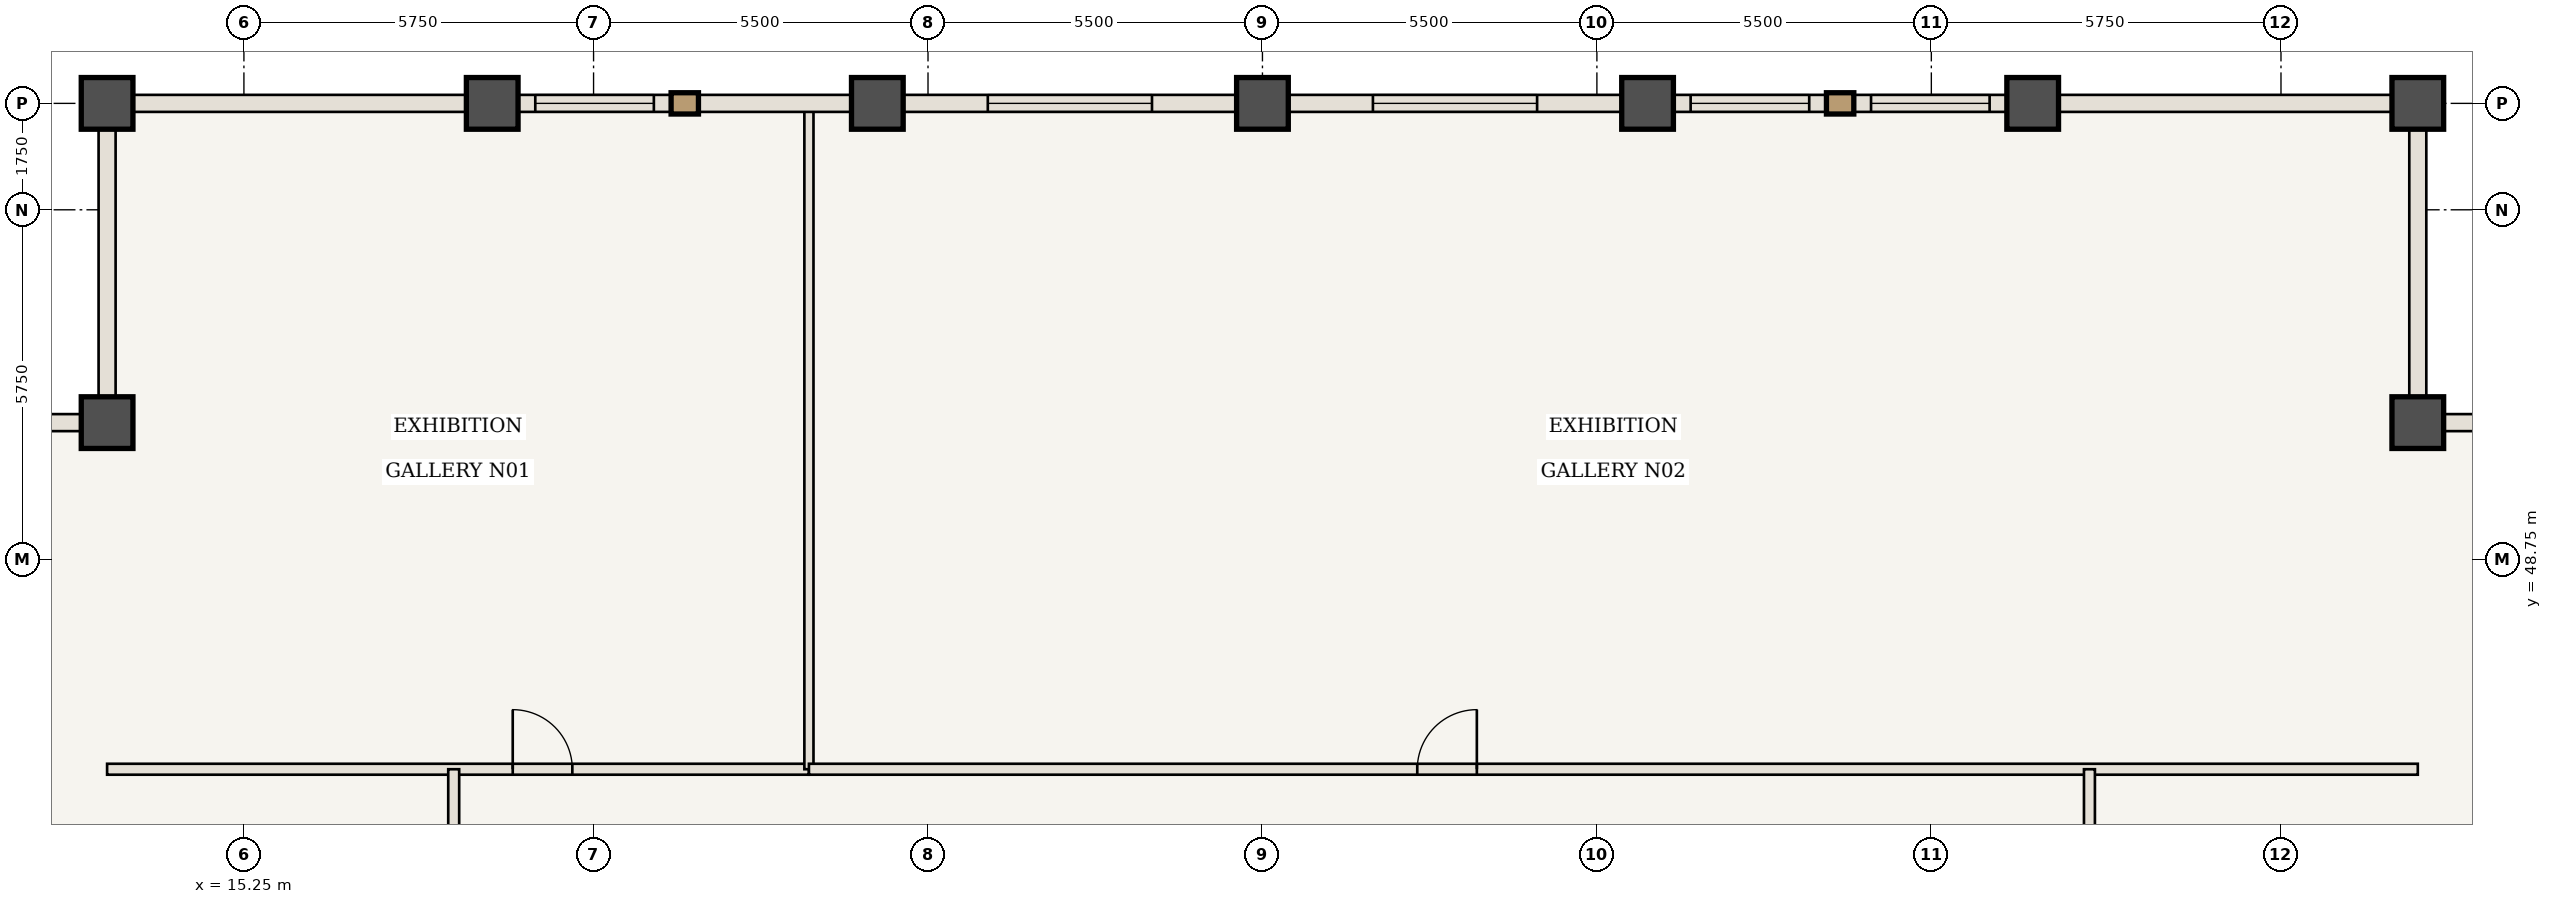
"""IFC4 building model, lengths in metres.
Left out: names, types, materials, properties, quantities, classifications, styles, units other than length and angle.
Written with IfcOpenShell. Run it as: python <this file> out.ifc"""

import sys

from ifc_helpers import new_model, si_unit, direction, frame, frame_2d, origin, origin_2d, place, context, subcontext, project, spatial, rectangle, extrude, element, fill, save


model = new_model("IFC4")
c1 = context("Model", 3, precision=1e-05, world=origin(), true_north=direction((0.0, 1.0)))
c2 = subcontext(c1, "Body", "Model", "MODEL_VIEW")
j1 = project(units=[si_unit("LENGTHUNIT", "METRE"), si_unit("PLANEANGLEUNIT", "RADIAN")], contexts=[c1])
p1 = place(None, origin())
s1 = spatial("IfcSite", under=j1, at=p1, CompositionType="ELEMENT")
p2 = place(p1, origin())
s2 = spatial("IfcBuilding", under=s1, at=p2, CompositionType="ELEMENT")
p3 = place(p2, frame((0.0, 0.0, 213.85)))
s3 = spatial("IfcBuildingStorey", under=s2, at=p3, CompositionType="ELEMENT", Elevation=213.85)
for number, where, z_axis, x_axis in (
    (1, (51.0, 51.0, 0.0), (0.0, 0.0, 1.0), (1.0, 0.0, 0.0)),
    (2, (51.0, 56.25, 0.0), (0.0, 0.0, 1.0), (1.0, 0.0, 0.0)),
    (3, (13.0, 56.25, 0.0), (0.0, 0.0, 1.0), (1.0, 0.0, 0.0)),
    (4, (13.0, 51.0, 0.0), (0.0, 0.0, 1.0), (1.0, 0.0, 0.0)),
    (5, (19.333, 56.25, 0.0), (0.0, 0.0, 1.0), (1.0, 0.0, 0.0)),
    (6, (25.667, 56.25, 0.0), (0.0, 0.0, 1.0), (1.0, 0.0, 0.0)),
    (7, (32.0, 56.25, 0.0), (0.0, 0.0, 1.0), (1.0, 0.0, 0.0)),
    (8, (38.333, 56.25, 0.0), (0.0, 0.0, 1.0), (1.0, 0.0, 0.0)),
    (9, (44.667, 56.25, 0.0), (0.0, 0.0, 1.0), (1.0, 0.0, 0.0)),
):
    element("IfcColumn", number, at=place(p3, frame(where, z_axis=z_axis, x_axis=x_axis)), inside=s3, PredefinedType="COLUMN", context=c2, shape_type="SweptSolid", body=[
        extrude(rectangle(XDim=0.85, YDim=0.85, at=origin_2d()), origin(), (0.0, 0.0, 1.0), 3.85),
    ])
p4 = place(p3, frame((13.0, 45.3, 0.0), z_axis=(0.0, 0.0, 1.0), x_axis=(1.0, 0.0, 0.0)))
e10 = element("IfcWall", 10, at=p4, inside=s3, PredefinedType="STANDARD", context=c2, shape_type="SweptSolid", body=[
    extrude(rectangle(XDim=11.542, YDim=0.18, at=frame_2d((5.771, 0.0))), origin(), (0.0, 0.0, 1.0), 3.685),
])
p5 = place(p4, frame((6.671, 0.0, 0.0)))
e11 = element("IfcOpeningElement", 11, at=p5, cuts=e10, PredefinedType="OPENING", context=c2, shape_type="SweptSolid", body=[
    extrude(rectangle(XDim=0.98, YDim=2.2, at=frame_2d((0.49, 1.1))), frame((0.0, 0.1, 0.0), z_axis=(0.0, -1.0, 0.0), x_axis=(1.0, 0.0, 0.0)), (0.0, 0.0, 1.0), 0.2),
])
p6 = place(p3, frame((24.542, 45.3, 0.0), z_axis=(0.0, 0.0, 1.0), x_axis=(0.0, 1.0, 0.0)))
e12 = element("IfcWall", 12, at=p6, inside=s3, PredefinedType="STANDARD", context=c2, shape_type="SweptSolid", body=[
    extrude(rectangle(XDim=10.89, YDim=0.15, at=frame_2d((5.445, 0.0))), origin(), (0.0, 0.0, 1.0), 3.685),
])
p7 = place(p3, frame((24.542, 45.3, 0.0), z_axis=(0.0, 0.0, 1.0), x_axis=(1.0, 0.0, 0.0)))
e13 = element("IfcWall", 13, at=p7, inside=s3, PredefinedType="STANDARD", context=c2, shape_type="SweptSolid", body=[
    extrude(rectangle(XDim=26.458, YDim=0.18, at=frame_2d((13.229, 0.0))), origin(), (0.0, 0.0, 1.0), 3.685),
])
p8 = place(p7, frame((10.004, 0.0, 0.0)))
e14 = element("IfcOpeningElement", 14, at=p8, cuts=e13, PredefinedType="OPENING", context=c2, shape_type="SweptSolid", body=[
    extrude(rectangle(XDim=0.98, YDim=2.2, at=frame_2d((0.49, 1.1))), frame((0.0, 0.1, 0.0), z_axis=(0.0, -1.0, 0.0), x_axis=(1.0, 0.0, 0.0)), (0.0, 0.0, 1.0), 0.2),
])
p9 = place(p3, frame((18.7, 39.258, 0.0), z_axis=(0.0, 0.0, 1.0), x_axis=(0.0, 1.0, 0.0)))
e15 = element("IfcWall", 15, at=p9, inside=s3, PredefinedType="STANDARD", context=c2, shape_type="SweptSolid", body=[
    extrude(rectangle(XDim=6.042, YDim=0.18, at=frame_2d((3.021, 0.0))), origin(), (0.0, 0.0, 1.0), 3.685),
])
p10 = place(p9, frame((1.071, 0.0, 0.0)))
e16 = element("IfcOpeningElement", 16, at=p10, cuts=e15, PredefinedType="OPENING", context=c2, shape_type="SweptSolid", body=[
    extrude(rectangle(XDim=0.98, YDim=2.2, at=frame_2d((0.49, 1.1))), frame((0.0, 0.1, 0.0), z_axis=(0.0, -1.0, 0.0), x_axis=(1.0, 0.0, 0.0)), (0.0, 0.0, 1.0), 0.2),
])
p11 = place(p3, frame((45.6, 32.85, 0.0), z_axis=(0.0, 0.0, 1.0), x_axis=(0.0, 1.0, 0.0)))
e17 = element("IfcWall", 17, at=p11, inside=s3, PredefinedType="STANDARD", context=c2, shape_type="SweptSolid", body=[
    extrude(rectangle(XDim=12.45, YDim=0.18, at=frame_2d((6.225, 0.0))), origin(), (0.0, 0.0, 1.0), 3.685),
])
p12 = place(p11, frame((5.725, 0.0, 0.0)))
e18 = element("IfcOpeningElement", 18, at=p12, cuts=e17, PredefinedType="OPENING", context=c2, shape_type="SweptSolid", body=[
    extrude(rectangle(XDim=0.98, YDim=2.2, at=frame_2d((0.49, 1.1))), frame((0.0, 0.1, 0.0), z_axis=(0.0, -1.0, 0.0), x_axis=(1.0, 0.0, 0.0)), (0.0, 0.0, 1.0), 0.2),
])
p13 = place(p3, frame((13.0, 56.25, 0.0), z_axis=(0.0, 0.0, 1.0), x_axis=(1.0, 0.0, 0.0)))
e19 = element("IfcWall", 19, at=p13, inside=s3, PredefinedType="USERDEFINED", context=c2, shape_type="SweptSolid", body=[
    extrude(rectangle(XDim=6.333, YDim=0.28, at=frame_2d((3.167, 0.0))), origin(), (0.0, 0.0, 1.0), 2.985),
])
p14 = place(p3, frame((19.333, 56.25, 0.0), z_axis=(0.0, 0.0, 1.0), x_axis=(1.0, 0.0, 0.0)))
e20 = element("IfcWall", 20, at=p14, inside=s3, PredefinedType="USERDEFINED", context=c2, shape_type="SweptSolid", body=[
    extrude(rectangle(XDim=6.333, YDim=0.28, at=frame_2d((3.167, 0.0))), origin(), (0.0, 0.0, 1.0), 2.985),
])
p15 = place(p14, frame((0.708, 0.0, 0.85)))
e21 = element("IfcOpeningElement", 21, at=p15, cuts=e20, PredefinedType="OPENING", context=c2, shape_type="SweptSolid", body=[
    extrude(rectangle(XDim=1.95, YDim=1.935, at=frame_2d((0.975, 0.968))), frame((0.0, 0.15, 0.0), z_axis=(0.0, -1.0, 0.0), x_axis=(1.0, 0.0, 0.0)), (0.0, 0.0, 1.0), 0.3),
])
p16 = place(p3, frame((25.667, 56.25, 0.0), z_axis=(0.0, 0.0, 1.0), x_axis=(1.0, 0.0, 0.0)))
e22 = element("IfcWall", 22, at=p16, inside=s3, PredefinedType="USERDEFINED", context=c2, shape_type="SweptSolid", body=[
    extrude(rectangle(XDim=6.333, YDim=0.28, at=frame_2d((3.167, 0.0))), origin(), (0.0, 0.0, 1.0), 2.985),
])
p17 = place(p16, frame((1.817, 0.0, 0.85)))
e23 = element("IfcOpeningElement", 23, at=p17, cuts=e22, PredefinedType="OPENING", context=c2, shape_type="SweptSolid", body=[
    extrude(rectangle(XDim=2.7, YDim=1.935, at=frame_2d((1.35, 0.968))), frame((0.0, 0.15, 0.0), z_axis=(0.0, -1.0, 0.0), x_axis=(1.0, 0.0, 0.0)), (0.0, 0.0, 1.0), 0.3),
])
p18 = place(p3, frame((32.0, 56.25, 0.0), z_axis=(0.0, 0.0, 1.0), x_axis=(1.0, 0.0, 0.0)))
e24 = element("IfcWall", 24, at=p18, inside=s3, PredefinedType="USERDEFINED", context=c2, shape_type="SweptSolid", body=[
    extrude(rectangle(XDim=6.333, YDim=0.28, at=frame_2d((3.167, 0.0))), origin(), (0.0, 0.0, 1.0), 2.985),
])
p19 = place(p18, frame((1.817, 0.0, 0.85)))
e25 = element("IfcOpeningElement", 25, at=p19, cuts=e24, PredefinedType="OPENING", context=c2, shape_type="SweptSolid", body=[
    extrude(rectangle(XDim=2.7, YDim=1.935, at=frame_2d((1.35, 0.968))), frame((0.0, 0.15, 0.0), z_axis=(0.0, -1.0, 0.0), x_axis=(1.0, 0.0, 0.0)), (0.0, 0.0, 1.0), 0.3),
])
p20 = place(p3, frame((38.333, 56.25, 0.0), z_axis=(0.0, 0.0, 1.0), x_axis=(1.0, 0.0, 0.0)))
e26 = element("IfcWall", 26, at=p20, inside=s3, PredefinedType="USERDEFINED", context=c2, shape_type="SweptSolid", body=[
    extrude(rectangle(XDim=6.333, YDim=0.28, at=frame_2d((3.167, 0.0))), origin(), (0.0, 0.0, 1.0), 2.985),
])
p21 = place(p20, frame((0.708, 0.0, 0.85)))
e27 = element("IfcOpeningElement", 27, at=p21, cuts=e26, PredefinedType="OPENING", context=c2, shape_type="SweptSolid", body=[
    extrude(rectangle(XDim=1.95, YDim=1.935, at=frame_2d((0.975, 0.968))), frame((0.0, 0.15, 0.0), z_axis=(0.0, -1.0, 0.0), x_axis=(1.0, 0.0, 0.0)), (0.0, 0.0, 1.0), 0.3),
])
p22 = place(p20, frame((3.675, 0.0, 0.85)))
e28 = element("IfcOpeningElement", 28, at=p22, cuts=e26, PredefinedType="OPENING", context=c2, shape_type="SweptSolid", body=[
    extrude(rectangle(XDim=1.95, YDim=1.935, at=frame_2d((0.975, 0.968))), frame((0.0, 0.15, 0.0), z_axis=(0.0, -1.0, 0.0), x_axis=(1.0, 0.0, 0.0)), (0.0, 0.0, 1.0), 0.3),
])
p23 = place(p3, frame((44.667, 56.25, 0.0), z_axis=(0.0, 0.0, 1.0), x_axis=(1.0, 0.0, 0.0)))
e29 = element("IfcWall", 29, at=p23, inside=s3, PredefinedType="USERDEFINED", context=c2, shape_type="SweptSolid", body=[
    extrude(rectangle(XDim=6.333, YDim=0.28, at=frame_2d((3.167, 0.0))), origin(), (0.0, 0.0, 1.0), 2.985),
])
for number, where, z_axis, x_axis in (
    (30, (51.0, 51.0, 0.0), (0.0, 0.0, 1.0), (1.0, 0.0, 0.0)),
    (31, (51.0, 56.25, 0.0), (0.0, 0.0, 1.0), (0.0, -1.0, 0.0)),
    (32, (13.0, 51.0, 0.0), (0.0, 0.0, 1.0), (0.0, 1.0, 0.0)),
    (33, (7.75, 51.0, 0.0), (0.0, 0.0, 1.0), (1.0, 0.0, 0.0)),
):
    element("IfcWall", number, at=place(p3, frame(where, z_axis=z_axis, x_axis=x_axis)), inside=s3, PredefinedType="USERDEFINED", context=c2, shape_type="SweptSolid", body=[
        extrude(rectangle(XDim=5.25, YDim=0.28, at=frame_2d((2.625, 0.0))), origin(), (0.0, 0.0, 1.0), 2.985),
    ])
p24 = place(p5, origin())
e34 = element("IfcDoor", 34, at=p24, inside=s3, OperationType="SINGLE_SWING_LEFT", PredefinedType="DOOR", context=c2, shape_type="SweptSolid", body=[
    extrude(rectangle(XDim=0.98, YDim=2.2, at=frame_2d((0.49, 1.1))), frame((0.0, 0.025, 0.0), z_axis=(0.0, -1.0, 0.0), x_axis=(1.0, 0.0, 0.0)), (0.0, 0.0, 1.0), 0.05),
])
fill(e11, e34)
p25 = place(p8, origin())
e35 = element("IfcDoor", 35, at=p25, inside=s3, OperationType="SINGLE_SWING_RIGHT", PredefinedType="DOOR", context=c2, shape_type="SweptSolid", body=[
    extrude(rectangle(XDim=0.98, YDim=2.2, at=frame_2d((0.49, 1.1))), frame((0.0, 0.025, 0.0), z_axis=(0.0, -1.0, 0.0), x_axis=(1.0, 0.0, 0.0)), (0.0, 0.0, 1.0), 0.05),
])
fill(e14, e35)
p26 = place(p15, origin())
e36 = element("IfcWindow", 36, at=p26, inside=s3, PartitioningType="SINGLE_PANEL", PredefinedType="WINDOW", context=c2, shape_type="SweptSolid", body=[
    extrude(rectangle(XDim=1.95, YDim=1.935, at=frame_2d((0.975, 0.968))), frame((0.0, 0.03, 0.0), z_axis=(0.0, -1.0, 0.0), x_axis=(1.0, 0.0, 0.0)), (0.0, 0.0, 1.0), 0.06),
])
fill(e21, e36)
p27 = place(p17, origin())
e37 = element("IfcWindow", 37, at=p27, inside=s3, PartitioningType="SINGLE_PANEL", PredefinedType="WINDOW", context=c2, shape_type="SweptSolid", body=[
    extrude(rectangle(XDim=2.7, YDim=1.935, at=frame_2d((1.35, 0.968))), frame((0.0, 0.03, 0.0), z_axis=(0.0, -1.0, 0.0), x_axis=(1.0, 0.0, 0.0)), (0.0, 0.0, 1.0), 0.06),
])
fill(e23, e37)
p28 = place(p19, origin())
e38 = element("IfcWindow", 38, at=p28, inside=s3, PartitioningType="SINGLE_PANEL", PredefinedType="WINDOW", context=c2, shape_type="SweptSolid", body=[
    extrude(rectangle(XDim=2.7, YDim=1.935, at=frame_2d((1.35, 0.968))), frame((0.0, 0.03, 0.0), z_axis=(0.0, -1.0, 0.0), x_axis=(1.0, 0.0, 0.0)), (0.0, 0.0, 1.0), 0.06),
])
fill(e25, e38)
p29 = place(p21, origin())
e39 = element("IfcWindow", 39, at=p29, inside=s3, PartitioningType="SINGLE_PANEL", PredefinedType="WINDOW", context=c2, shape_type="SweptSolid", body=[
    extrude(rectangle(XDim=1.95, YDim=1.935, at=frame_2d((0.975, 0.968))), frame((0.0, 0.03, 0.0), z_axis=(0.0, -1.0, 0.0), x_axis=(1.0, 0.0, 0.0)), (0.0, 0.0, 1.0), 0.06),
])
fill(e27, e39)
p30 = place(p22, origin())
e40 = element("IfcWindow", 40, at=p30, inside=s3, PartitioningType="SINGLE_PANEL", PredefinedType="WINDOW", context=c2, shape_type="SweptSolid", body=[
    extrude(rectangle(XDim=1.95, YDim=1.935, at=frame_2d((0.975, 0.968))), frame((0.0, 0.03, 0.0), z_axis=(0.0, -1.0, 0.0), x_axis=(1.0, 0.0, 0.0)), (0.0, 0.0, 1.0), 0.06),
])
fill(e28, e40)
save(model, sys.argv[1])
